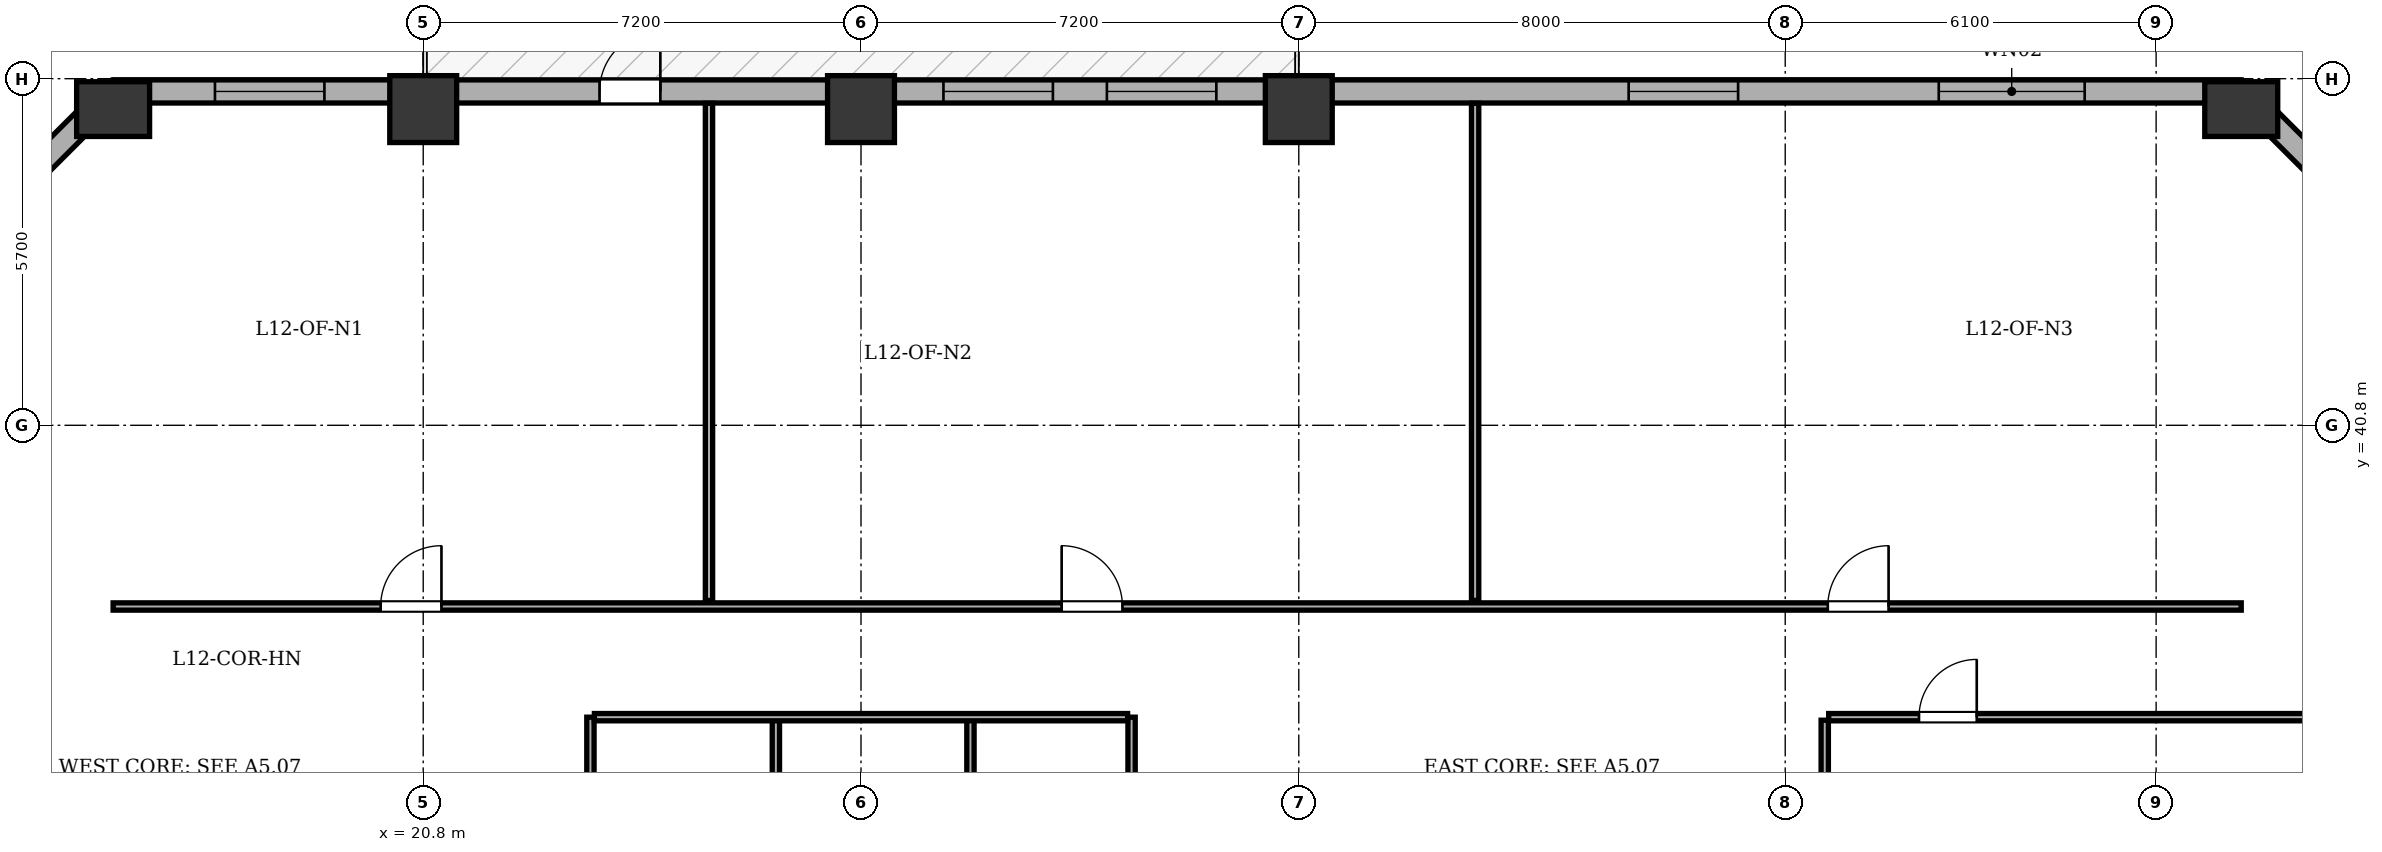
"""IFC4 building model, lengths in metres.
Left out: names, types, materials, properties, quantities, classifications, styles, units other than length and angle.
Written with IfcOpenShell. Run it as: python <this file> out.ifc"""

import sys

from ifc_helpers import new_model, si_unit, direction, frame, frame_2d, origin, origin_2d, place, context, subcontext, project, spatial, rectangle, extrude, element, fill, save


model = new_model("IFC4")
c1 = context("Model", 3, precision=1e-05, world=origin(), true_north=direction((0.0, 1.0)))
c2 = subcontext(c1, "Body", "Model", "MODEL_VIEW")
j1 = project(units=[si_unit("LENGTHUNIT", "METRE"), si_unit("PLANEANGLEUNIT", "RADIAN")], contexts=[c1])
p1 = place(None, origin())
s1 = spatial("IfcSite", under=j1, at=p1, CompositionType="ELEMENT")
p2 = place(p1, origin())
s2 = spatial("IfcBuilding", under=s1, at=p2, CompositionType="ELEMENT")
p3 = place(p2, frame((0.0, 0.0, 51.6)))
s3 = spatial("IfcBuildingStorey", under=s2, at=p3, CompositionType="ELEMENT", Elevation=51.6)
p4 = place(p3, frame((15.7, 46.0, 0.0), z_axis=(0.0, 0.0, 1.0), x_axis=(1.0, 0.0, 0.0)))
e1 = element("IfcColumn", 1, at=p4, inside=s3, PredefinedType="COLUMN", context=c2, shape_type="SweptSolid", body=[
    extrude(rectangle(XDim=0.9, YDim=1.2, at=origin_2d()), origin(), (0.0, 0.0, 1.0), 3.9),
])
for number, where, z_axis, x_axis in (
    (2, (20.8, 46.0, 0.0), (0.0, 0.0, 1.0), (1.0, 0.0, 0.0)),
    (3, (28.0, 46.0, 0.0), (0.0, 0.0, 1.0), (1.0, 0.0, 0.0)),
    (4, (35.2, 46.0, 0.0), (0.0, 0.0, 1.0), (1.0, 0.0, 0.0)),
):
    element("IfcColumn", number, at=place(p3, frame(where, z_axis=z_axis, x_axis=x_axis)), inside=s3, PredefinedType="COLUMN", context=c2, shape_type="SweptSolid", body=[
        extrude(rectangle(XDim=1.1, YDim=1.1, at=origin_2d()), origin(), (0.0, 0.0, 1.0), 3.9),
    ])
p5 = place(p3, frame((50.7, 46.0, 0.0), z_axis=(0.0, 0.0, 1.0), x_axis=(1.0, 0.0, 0.0)))
e5 = element("IfcColumn", 5, at=p5, inside=s3, PredefinedType="COLUMN", context=c2, shape_type="SweptSolid", body=[
    extrude(rectangle(XDim=0.9, YDim=1.2, at=origin_2d()), origin(), (0.0, 0.0, 1.0), 3.9),
])
p6 = place(p3, frame((10.91, 41.5, 0.0), z_axis=(0.0, 0.0, 1.0), x_axis=(0.707106781187, 0.707106781187, 0.0)))
e6 = element("IfcWall", 6, at=p6, inside=s3, PredefinedType="STANDARD", context=c2, shape_type="SweptSolid", body=[
    extrude(rectangle(XDim=6.774, YDim=0.38, at=frame_2d((3.387, 0.0))), origin(), (0.0, 0.0, 1.0), 3.135),
])
p7 = place(p6, frame((2.687, 0.0, 0.8)))
e7 = element("IfcOpeningElement", 7, at=p7, cuts=e6, PredefinedType="OPENING", context=c2, shape_type="SweptSolid", body=[
    extrude(rectangle(XDim=1.4, YDim=1.65, at=frame_2d((0.7, 0.825))), frame((0.0, 0.2, 0.0), z_axis=(0.0, -1.0, 0.0), x_axis=(1.0, 0.0, 0.0)), (0.0, 0.0, 1.0), 0.4),
])
p8 = place(p3, frame((15.7, 46.29, 0.0), z_axis=(0.0, 0.0, 1.0), x_axis=(1.0, 0.0, 0.0)))
e8 = element("IfcWall", 8, at=p8, inside=s3, PredefinedType="STANDARD", context=c2, shape_type="SweptSolid", body=[
    extrude(rectangle(XDim=35.0, YDim=0.38, at=frame_2d((17.5, 0.0))), origin(), (0.0, 0.0, 1.0), 3.135),
])
p9 = place(p8, frame((8.0, 0.0, 0.0)))
e9 = element("IfcOpeningElement", 9, at=p9, cuts=e8, PredefinedType="OPENING", context=c2, shape_type="SweptSolid", body=[
    extrude(rectangle(XDim=1.0, YDim=2.02, at=frame_2d((0.5, 1.01))), frame((0.0, 0.2, 0.0), z_axis=(0.0, -1.0, 0.0), x_axis=(1.0, 0.0, 0.0)), (0.0, 0.0, 1.0), 0.4),
])
p10 = place(p8, frame((1.675, 0.0, 0.8)))
e10 = element("IfcOpeningElement", 10, at=p10, cuts=e8, PredefinedType="OPENING", context=c2, shape_type="SweptSolid", body=[
    extrude(rectangle(XDim=1.8, YDim=1.9, at=frame_2d((0.9, 0.95))), frame((0.0, 0.2, 0.0), z_axis=(0.0, -1.0, 0.0), x_axis=(1.0, 0.0, 0.0)), (0.0, 0.0, 1.0), 0.4),
])
p11 = place(p8, frame((13.656, 0.0, 0.8)))
e11 = element("IfcOpeningElement", 11, at=p11, cuts=e8, PredefinedType="OPENING", context=c2, shape_type="SweptSolid", body=[
    extrude(rectangle(XDim=1.8, YDim=1.9, at=frame_2d((0.9, 0.95))), frame((0.0, 0.2, 0.0), z_axis=(0.0, -1.0, 0.0), x_axis=(1.0, 0.0, 0.0)), (0.0, 0.0, 1.0), 0.4),
])
p12 = place(p8, frame((16.344, 0.0, 0.8)))
e12 = element("IfcOpeningElement", 12, at=p12, cuts=e8, PredefinedType="OPENING", context=c2, shape_type="SweptSolid", body=[
    extrude(rectangle(XDim=1.8, YDim=1.9, at=frame_2d((0.9, 0.95))), frame((0.0, 0.2, 0.0), z_axis=(0.0, -1.0, 0.0), x_axis=(1.0, 0.0, 0.0)), (0.0, 0.0, 1.0), 0.4),
])
p13 = place(p8, frame((24.925, 0.0, 0.8)))
e13 = element("IfcOpeningElement", 13, at=p13, cuts=e8, PredefinedType="OPENING", context=c2, shape_type="SweptSolid", body=[
    extrude(rectangle(XDim=1.8, YDim=1.9, at=frame_2d((0.9, 0.95))), frame((0.0, 0.2, 0.0), z_axis=(0.0, -1.0, 0.0), x_axis=(1.0, 0.0, 0.0)), (0.0, 0.0, 1.0), 0.4),
])
p14 = place(p8, frame((30.025, 0.0, 0.8)))
e14 = element("IfcOpeningElement", 14, at=p14, cuts=e8, PredefinedType="OPENING", context=c2, shape_type="SweptSolid", body=[
    extrude(rectangle(XDim=2.4, YDim=1.9, at=frame_2d((1.2, 0.95))), frame((0.0, 0.2, 0.0), z_axis=(0.0, -1.0, 0.0), x_axis=(1.0, 0.0, 0.0)), (0.0, 0.0, 1.0), 0.4),
])
p15 = place(p3, frame((50.7, 46.29, 0.0), z_axis=(0.0, 0.0, 1.0), x_axis=(0.707106781187, -0.707106781187, 0.0)))
e15 = element("IfcWall", 15, at=p15, inside=s3, PredefinedType="STANDARD", context=c2, shape_type="SweptSolid", body=[
    extrude(rectangle(XDim=6.774, YDim=0.38, at=frame_2d((3.387, 0.0))), origin(), (0.0, 0.0, 1.0), 3.135),
])
p16 = place(p15, frame((2.687, 0.0, 0.8)))
e16 = element("IfcOpeningElement", 16, at=p16, cuts=e15, PredefinedType="OPENING", context=c2, shape_type="SweptSolid", body=[
    extrude(rectangle(XDim=1.4, YDim=1.65, at=frame_2d((0.7, 0.825))), frame((0.0, 0.2, 0.0), z_axis=(0.0, -1.0, 0.0), x_axis=(1.0, 0.0, 0.0)), (0.0, 0.0, 1.0), 0.4),
])
for number, where, z_axis, x_axis in (
    (17, (23.55, 24.715, 0.0), (0.0, 0.0, 1.0), (0.0, 1.0, 0.0)),
    (18, (32.45, 24.715, 0.0), (0.0, 0.0, 1.0), (0.0, 1.0, 0.0)),
    (19, (26.6, 24.715, 0.0), (0.0, 0.0, 1.0), (0.0, 1.0, 0.0)),
):
    element("IfcWall", number, at=place(p3, frame(where, z_axis=z_axis, x_axis=x_axis)), inside=s3, PredefinedType="PARTITIONING", context=c2, shape_type="SweptSolid", body=[
        extrude(rectangle(XDim=11.285, YDim=0.12, at=frame_2d((5.643, 0.0))), origin(), (0.0, 0.0, 1.0), 3.6),
    ])
p17 = place(p3, frame((29.8, 24.715, 0.0), z_axis=(0.0, 0.0, 1.0), x_axis=(0.0, 1.0, 0.0)))
e20 = element("IfcWall", 20, at=p17, inside=s3, PredefinedType="PARTITIONING", context=c2, shape_type="SweptSolid", body=[
    extrude(rectangle(XDim=11.285, YDim=0.12, at=frame_2d((5.643, 0.0))), origin(), (0.0, 0.0, 1.0), 3.135),
])
p18 = place(p3, frame((23.615, 36.0, 0.0), z_axis=(0.0, 0.0, 1.0), x_axis=(1.0, 0.0, 0.0)))
e21 = element("IfcWall", 21, at=p18, inside=s3, PredefinedType="PARTITIONING", context=c2, shape_type="SweptSolid", body=[
    extrude(rectangle(XDim=8.77, YDim=0.12, at=frame_2d((4.385, 0.0))), origin(), (0.0, 0.0, 1.0), 3.6),
])
p19 = place(p3, frame((15.7, 37.82, 0.0), z_axis=(0.0, 0.0, 1.0), x_axis=(1.0, 0.0, 0.0)))
e22 = element("IfcWall", 22, at=p19, inside=s3, PredefinedType="PARTITIONING", context=c2, shape_type="SweptSolid", body=[
    extrude(rectangle(XDim=35.0, YDim=0.12, at=frame_2d((17.5, 0.0))), origin(), (0.0, 0.0, 1.0), 3.6),
])
p20 = place(p19, frame((4.4, 0.0, 0.0)))
e23 = element("IfcOpeningElement", 23, at=p20, cuts=e22, PredefinedType="OPENING", context=c2, shape_type="SweptSolid", body=[
    extrude(rectangle(XDim=1.0, YDim=2.1, at=frame_2d((0.5, 1.05))), frame((0.0, 0.07, 0.0), z_axis=(0.0, -1.0, 0.0), x_axis=(1.0, 0.0, 0.0)), (0.0, 0.0, 1.0), 0.14),
])
p21 = place(p19, frame((15.6, 0.0, 0.0)))
e24 = element("IfcOpeningElement", 24, at=p21, cuts=e22, PredefinedType="OPENING", context=c2, shape_type="SweptSolid", body=[
    extrude(rectangle(XDim=1.0, YDim=2.1, at=frame_2d((0.5, 1.05))), frame((0.0, 0.07, 0.0), z_axis=(0.0, -1.0, 0.0), x_axis=(1.0, 0.0, 0.0)), (0.0, 0.0, 1.0), 0.14),
])
p22 = place(p19, frame((28.2, 0.0, 0.0)))
e25 = element("IfcOpeningElement", 25, at=p22, cuts=e22, PredefinedType="OPENING", context=c2, shape_type="SweptSolid", body=[
    extrude(rectangle(XDim=1.0, YDim=2.1, at=frame_2d((0.5, 1.05))), frame((0.0, 0.07, 0.0), z_axis=(0.0, -1.0, 0.0), x_axis=(1.0, 0.0, 0.0)), (0.0, 0.0, 1.0), 0.14),
])
for number, where, z_axis, x_axis in (
    (26, (25.5, 37.92, 0.0), (0.0, 0.0, 1.0), (0.0, 1.0, 0.0)),
    (27, (38.1, 37.92, 0.0), (0.0, 0.0, 1.0), (0.0, 1.0, 0.0)),
):
    element("IfcWall", number, at=place(p3, frame(where, z_axis=z_axis, x_axis=x_axis)), inside=s3, PredefinedType="PARTITIONING", context=c2, shape_type="SweptSolid", body=[
        extrude(rectangle(XDim=8.175, YDim=0.12, at=frame_2d((4.087, 0.0))), origin(), (0.0, 0.0, 1.0), 3.6),
    ])
p23 = place(p3, frame((43.85, 18.45, 0.0), z_axis=(0.0, 0.0, 1.0), x_axis=(0.0, 1.0, 0.0)))
e28 = element("IfcWall", 28, at=p23, inside=s3, PredefinedType="PARTITIONING", context=c2, shape_type="SweptSolid", body=[
    extrude(rectangle(XDim=17.5, YDim=0.12, at=frame_2d((8.75, 0.0))), origin(), (0.0, 0.0, 1.0), 3.6),
])
p24 = place(p3, frame((43.915, 36.0, 0.0), z_axis=(0.0, 0.0, 1.0), x_axis=(1.0, 0.0, 0.0)))
e29 = element("IfcWall", 29, at=p24, inside=s3, PredefinedType="PARTITIONING", context=c2, shape_type="SweptSolid", body=[
    extrude(rectangle(XDim=11.38, YDim=0.12, at=frame_2d((5.69, 0.0))), origin(), (0.0, 0.0, 1.0), 3.6),
])
p25 = place(p24, frame((1.485, 0.0, 0.0)))
e30 = element("IfcOpeningElement", 30, at=p25, cuts=e29, PredefinedType="OPENING", context=c2, shape_type="SweptSolid", body=[
    extrude(rectangle(XDim=0.95, YDim=2.1, at=frame_2d((0.475, 1.05))), frame((0.0, 0.07, 0.0), z_axis=(0.0, -1.0, 0.0), x_axis=(1.0, 0.0, 0.0)), (0.0, 0.0, 1.0), 0.14),
])
p26 = place(p9, origin())
e31 = element("IfcDoor", 31, at=p26, inside=s3, OperationType="SINGLE_SWING_RIGHT", PredefinedType="DOOR", context=c2, shape_type="SweptSolid", body=[
    extrude(rectangle(XDim=1.0, YDim=2.02, at=frame_2d((0.5, 1.01))), frame((0.0, 0.025, 0.0), z_axis=(0.0, -1.0, 0.0), x_axis=(1.0, 0.0, 0.0)), (0.0, 0.0, 1.0), 0.05),
])
fill(e9, e31)
p27 = place(p10, origin())
e32 = element("IfcWindow", 32, at=p27, inside=s3, PartitioningType="SINGLE_PANEL", PredefinedType="WINDOW", context=c2, shape_type="SweptSolid", body=[
    extrude(rectangle(XDim=1.8, YDim=1.9, at=frame_2d((0.9, 0.95))), frame((0.0, -0.01, 0.0), z_axis=(0.0, -1.0, 0.0), x_axis=(1.0, 0.0, 0.0)), (0.0, 0.0, 1.0), 0.06),
])
fill(e10, e32)
p28 = place(p11, origin())
e33 = element("IfcWindow", 33, at=p28, inside=s3, PartitioningType="SINGLE_PANEL", PredefinedType="WINDOW", context=c2, shape_type="SweptSolid", body=[
    extrude(rectangle(XDim=1.8, YDim=1.9, at=frame_2d((0.9, 0.95))), frame((0.0, -0.01, 0.0), z_axis=(0.0, -1.0, 0.0), x_axis=(1.0, 0.0, 0.0)), (0.0, 0.0, 1.0), 0.06),
])
fill(e11, e33)
p29 = place(p12, origin())
e34 = element("IfcWindow", 34, at=p29, inside=s3, PartitioningType="SINGLE_PANEL", PredefinedType="WINDOW", context=c2, shape_type="SweptSolid", body=[
    extrude(rectangle(XDim=1.8, YDim=1.9, at=frame_2d((0.9, 0.95))), frame((0.0, -0.01, 0.0), z_axis=(0.0, -1.0, 0.0), x_axis=(1.0, 0.0, 0.0)), (0.0, 0.0, 1.0), 0.06),
])
fill(e12, e34)
p30 = place(p13, origin())
e35 = element("IfcWindow", 35, at=p30, inside=s3, PartitioningType="SINGLE_PANEL", PredefinedType="WINDOW", context=c2, shape_type="SweptSolid", body=[
    extrude(rectangle(XDim=1.8, YDim=1.9, at=frame_2d((0.9, 0.95))), frame((0.0, -0.01, 0.0), z_axis=(0.0, -1.0, 0.0), x_axis=(1.0, 0.0, 0.0)), (0.0, 0.0, 1.0), 0.06),
])
fill(e13, e35)
p31 = place(p14, origin())
e36 = element("IfcWindow", 36, at=p31, inside=s3, PartitioningType="SINGLE_PANEL", PredefinedType="WINDOW", context=c2, shape_type="SweptSolid", body=[
    extrude(rectangle(XDim=2.4, YDim=1.9, at=frame_2d((1.2, 0.95))), frame((0.0, -0.01, 0.0), z_axis=(0.0, -1.0, 0.0), x_axis=(1.0, 0.0, 0.0)), (0.0, 0.0, 1.0), 0.06),
])
fill(e14, e36)
p32 = place(p20, origin())
e37 = element("IfcDoor", 37, at=p32, inside=s3, OperationType="SINGLE_SWING_RIGHT", PredefinedType="DOOR", context=c2, shape_type="SweptSolid", body=[
    extrude(rectangle(XDim=1.0, YDim=2.1, at=frame_2d((0.5, 1.05))), frame((0.0, 0.025, 0.0), z_axis=(0.0, -1.0, 0.0), x_axis=(1.0, 0.0, 0.0)), (0.0, 0.0, 1.0), 0.05),
])
fill(e23, e37)
p33 = place(p21, origin())
e38 = element("IfcDoor", 38, at=p33, inside=s3, OperationType="SINGLE_SWING_LEFT", PredefinedType="DOOR", context=c2, shape_type="SweptSolid", body=[
    extrude(rectangle(XDim=1.0, YDim=2.1, at=frame_2d((0.5, 1.05))), frame((0.0, 0.025, 0.0), z_axis=(0.0, -1.0, 0.0), x_axis=(1.0, 0.0, 0.0)), (0.0, 0.0, 1.0), 0.05),
])
fill(e24, e38)
p34 = place(p22, origin())
e39 = element("IfcDoor", 39, at=p34, inside=s3, OperationType="SINGLE_SWING_RIGHT", PredefinedType="DOOR", context=c2, shape_type="SweptSolid", body=[
    extrude(rectangle(XDim=1.0, YDim=2.1, at=frame_2d((0.5, 1.05))), frame((0.0, 0.025, 0.0), z_axis=(0.0, -1.0, 0.0), x_axis=(1.0, 0.0, 0.0)), (0.0, 0.0, 1.0), 0.05),
])
fill(e25, e39)
p35 = place(p25, origin())
e40 = element("IfcDoor", 40, at=p35, inside=s3, OperationType="SINGLE_SWING_RIGHT", PredefinedType="DOOR", context=c2, shape_type="SweptSolid", body=[
    extrude(rectangle(XDim=0.95, YDim=2.1, at=frame_2d((0.475, 1.05))), frame((0.0, 0.025, 0.0), z_axis=(0.0, -1.0, 0.0), x_axis=(1.0, 0.0, 0.0)), (0.0, 0.0, 1.0), 0.05),
])
fill(e30, e40)
save(model, sys.argv[1])
